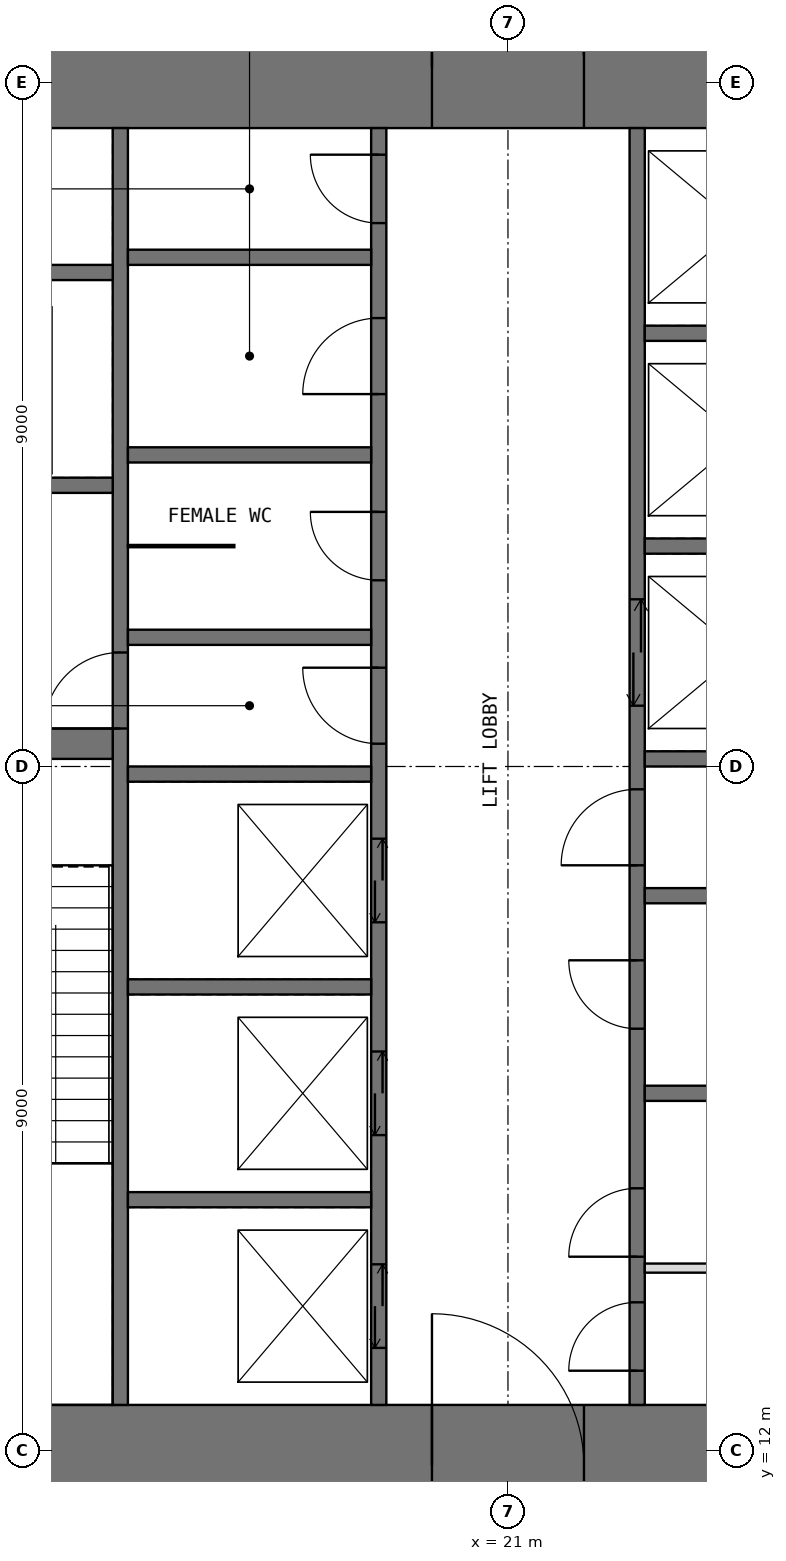
"""IFC4 building model, lengths in metres.
Left out: names, types, materials, properties, quantities, classifications, styles, units other than length and angle.
Written with IfcOpenShell. Run it as: python <this file> out.ifc"""

import sys

from ifc_helpers import new_model, si_unit, direction, frame, frame_2d, origin, place, context, subcontext, project, spatial, rectangle, extrude, element, fill, save


model = new_model("IFC4")
c1 = context("Model", 3, precision=1e-05, world=origin(), true_north=direction((0.0, 1.0)))
c2 = subcontext(c1, "Body", "Model", "MODEL_VIEW")
j1 = project(units=[si_unit("LENGTHUNIT", "METRE"), si_unit("PLANEANGLEUNIT", "RADIAN")], contexts=[c1])
p1 = place(None, origin())
s1 = spatial("IfcSite", under=j1, at=p1, CompositionType="ELEMENT")
p2 = place(p1, origin())
s2 = spatial("IfcBuilding", under=s1, at=p2, CompositionType="ELEMENT")
p3 = place(p2, frame((0.0, 0.0, 91.5)))
s3 = spatial("IfcBuildingStorey", under=s2, at=p3, CompositionType="ELEMENT", Elevation=91.5)
p4 = place(p3, frame((11.0, 11.8, -0.05), z_axis=(0.0, 0.0, 1.0), x_axis=(1.0, 0.0, 0.0)))
e1 = element("IfcWall", 1, at=p4, inside=s3, PredefinedType="SHEAR", context=c2, shape_type="SweptSolid", body=[
    extrude(rectangle(XDim=20.0, YDim=1.6, at=frame_2d((10.0, 0.0))), origin(), (0.0, 0.0, 1.0), 5.0),
])
p5 = place(p4, frame((9.0, 0.0, 0.05)))
e2 = element("IfcOpeningElement", 2, at=p5, cuts=e1, PredefinedType="OPENING", context=c2, shape_type="SweptSolid", body=[
    extrude(rectangle(XDim=2.0, YDim=2.2, at=frame_2d((1.0, 1.1))), frame((0.0, 0.81, 0.0), z_axis=(0.0, -1.0, 0.0), x_axis=(1.0, 0.0, 0.0)), (0.0, 0.0, 1.0), 1.62),
])
p6 = place(p3, frame((11.0, 30.2, -0.05), z_axis=(0.0, 0.0, 1.0), x_axis=(1.0, 0.0, 0.0)))
e3 = element("IfcWall", 3, at=p6, inside=s3, PredefinedType="SHEAR", context=c2, shape_type="SweptSolid", body=[
    extrude(rectangle(XDim=20.0, YDim=1.6, at=frame_2d((10.0, 0.0))), origin(), (0.0, 0.0, 1.0), 5.0),
])
p7 = place(p6, frame((9.0, 0.0, 0.05)))
e4 = element("IfcOpeningElement", 4, at=p7, cuts=e3, PredefinedType="OPENING", context=c2, shape_type="SweptSolid", body=[
    extrude(rectangle(XDim=2.0, YDim=2.2, at=frame_2d((1.0, 1.1))), frame((0.0, 0.81, 0.0), z_axis=(0.0, -1.0, 0.0), x_axis=(1.0, 0.0, 0.0)), (0.0, 0.0, 1.0), 1.62),
])
p8 = place(p3, frame((15.9, 12.6, -0.05), z_axis=(0.0, 0.0, 1.0), x_axis=(0.0, 1.0, 0.0)))
e5 = element("IfcWall", 5, at=p8, inside=s3, PredefinedType="SHEAR", context=c2, shape_type="SweptSolid", body=[
    extrude(rectangle(XDim=16.8, YDim=0.2, at=frame_2d((8.4, 0.0))), origin(), (0.0, 0.0, 1.0), 5.0),
])
p9 = place(p8, frame((8.9, 0.0, 0.05)))
e6 = element("IfcOpeningElement", 6, at=p9, cuts=e5, PredefinedType="OPENING", context=c2, shape_type="SweptSolid", body=[
    extrude(rectangle(XDim=1.0, YDim=2.2, at=frame_2d((0.5, 1.1))), frame((0.0, 0.11, 0.0), z_axis=(0.0, -1.0, 0.0), x_axis=(1.0, 0.0, 0.0)), (0.0, 0.0, 1.0), 0.22),
])
p10 = place(p3, frame((19.3, 12.6, -0.05), z_axis=(0.0, 0.0, 1.0), x_axis=(0.0, 1.0, 0.0)))
e7 = element("IfcWall", 7, at=p10, inside=s3, PredefinedType="SHEAR", context=c2, shape_type="SweptSolid", body=[
    extrude(rectangle(XDim=16.8, YDim=0.2, at=frame_2d((8.4, 0.0))), origin(), (0.0, 0.0, 1.0), 5.0),
])
p11 = place(p10, frame((8.7, 0.0, 0.05)))
e8 = element("IfcOpeningElement", 8, at=p11, cuts=e7, PredefinedType="OPENING", context=c2, shape_type="SweptSolid", body=[
    extrude(rectangle(XDim=1.0, YDim=2.2, at=frame_2d((0.5, 1.1))), frame((0.0, 0.11, 0.0), z_axis=(0.0, -1.0, 0.0), x_axis=(1.0, 0.0, 0.0)), (0.0, 0.0, 1.0), 0.22),
])
p12 = place(p10, frame((10.85, 0.0, 0.05)))
e9 = element("IfcOpeningElement", 9, at=p12, cuts=e7, PredefinedType="OPENING", context=c2, shape_type="SweptSolid", body=[
    extrude(rectangle(XDim=0.9, YDim=2.2, at=frame_2d((0.45, 1.1))), frame((0.0, 0.11, 0.0), z_axis=(0.0, -1.0, 0.0), x_axis=(1.0, 0.0, 0.0)), (0.0, 0.0, 1.0), 0.22),
])
p13 = place(p10, frame((13.3, 0.0, 0.05)))
e10 = element("IfcOpeningElement", 10, at=p13, cuts=e7, PredefinedType="OPENING", context=c2, shape_type="SweptSolid", body=[
    extrude(rectangle(XDim=1.0, YDim=2.2, at=frame_2d((0.5, 1.1))), frame((0.0, 0.11, 0.0), z_axis=(0.0, -1.0, 0.0), x_axis=(1.0, 0.0, 0.0)), (0.0, 0.0, 1.0), 0.22),
])
p14 = place(p10, frame((15.55, 0.0, 0.05)))
e11 = element("IfcOpeningElement", 11, at=p14, cuts=e7, PredefinedType="OPENING", context=c2, shape_type="SweptSolid", body=[
    extrude(rectangle(XDim=0.9, YDim=2.2, at=frame_2d((0.45, 1.1))), frame((0.0, 0.11, 0.0), z_axis=(0.0, -1.0, 0.0), x_axis=(1.0, 0.0, 0.0)), (0.0, 0.0, 1.0), 0.22),
])
p15 = place(p10, frame((0.75, 0.0, 0.05)))
e12 = element("IfcOpeningElement", 12, at=p15, cuts=e7, PredefinedType="OPENING", context=c2, shape_type="SweptSolid", body=[
    extrude(rectangle(XDim=1.1, YDim=2.2, at=frame_2d((0.55, 1.1))), frame((0.0, 0.11, 0.0), z_axis=(0.0, -1.0, 0.0), x_axis=(1.0, 0.0, 0.0)), (0.0, 0.0, 1.0), 0.22),
])
p16 = place(p10, frame((3.55, 0.0, 0.05)))
e13 = element("IfcOpeningElement", 13, at=p16, cuts=e7, PredefinedType="OPENING", context=c2, shape_type="SweptSolid", body=[
    extrude(rectangle(XDim=1.1, YDim=2.2, at=frame_2d((0.55, 1.1))), frame((0.0, 0.11, 0.0), z_axis=(0.0, -1.0, 0.0), x_axis=(1.0, 0.0, 0.0)), (0.0, 0.0, 1.0), 0.22),
])
p17 = place(p10, frame((6.35, 0.0, 0.05)))
e14 = element("IfcOpeningElement", 14, at=p17, cuts=e7, PredefinedType="OPENING", context=c2, shape_type="SweptSolid", body=[
    extrude(rectangle(XDim=1.1, YDim=2.2, at=frame_2d((0.55, 1.1))), frame((0.0, 0.11, 0.0), z_axis=(0.0, -1.0, 0.0), x_axis=(1.0, 0.0, 0.0)), (0.0, 0.0, 1.0), 0.22),
])
p18 = place(p3, frame((22.7, 12.6, -0.05), z_axis=(0.0, 0.0, 1.0), x_axis=(0.0, 1.0, 0.0)))
e15 = element("IfcWall", 15, at=p18, inside=s3, PredefinedType="SHEAR", context=c2, shape_type="SweptSolid", body=[
    extrude(rectangle(XDim=16.8, YDim=0.2, at=frame_2d((8.4, 0.0))), origin(), (0.0, 0.0, 1.0), 5.0),
])
p19 = place(p18, frame((0.45, 0.0, 0.05)))
e16 = element("IfcOpeningElement", 16, at=p19, cuts=e15, PredefinedType="OPENING", context=c2, shape_type="SweptSolid", body=[
    extrude(rectangle(XDim=0.9, YDim=2.2, at=frame_2d((0.45, 1.1))), frame((0.0, 0.11, 0.0), z_axis=(0.0, -1.0, 0.0), x_axis=(1.0, 0.0, 0.0)), (0.0, 0.0, 1.0), 0.22),
])
p20 = place(p18, frame((7.1, 0.0, 0.05)))
e17 = element("IfcOpeningElement", 17, at=p20, cuts=e15, PredefinedType="OPENING", context=c2, shape_type="SweptSolid", body=[
    extrude(rectangle(XDim=1.0, YDim=2.2, at=frame_2d((0.5, 1.1))), frame((0.0, 0.11, 0.0), z_axis=(0.0, -1.0, 0.0), x_axis=(1.0, 0.0, 0.0)), (0.0, 0.0, 1.0), 0.22),
])
p21 = place(p18, frame((1.95, 0.0, 0.05)))
e18 = element("IfcOpeningElement", 18, at=p21, cuts=e15, PredefinedType="OPENING", context=c2, shape_type="SweptSolid", body=[
    extrude(rectangle(XDim=0.9, YDim=2.2, at=frame_2d((0.45, 1.1))), frame((0.0, 0.11, 0.0), z_axis=(0.0, -1.0, 0.0), x_axis=(1.0, 0.0, 0.0)), (0.0, 0.0, 1.0), 0.22),
])
p22 = place(p18, frame((4.95, 0.0, 0.05)))
e19 = element("IfcOpeningElement", 19, at=p22, cuts=e15, PredefinedType="OPENING", context=c2, shape_type="SweptSolid", body=[
    extrude(rectangle(XDim=0.9, YDim=2.2, at=frame_2d((0.45, 1.1))), frame((0.0, 0.11, 0.0), z_axis=(0.0, -1.0, 0.0), x_axis=(1.0, 0.0, 0.0)), (0.0, 0.0, 1.0), 0.22),
])
p23 = place(p18, frame((9.2, 0.0, 0.05)))
e20 = element("IfcOpeningElement", 20, at=p23, cuts=e15, PredefinedType="OPENING", context=c2, shape_type="SweptSolid", body=[
    extrude(rectangle(XDim=1.4, YDim=2.4, at=frame_2d((0.7, 1.2))), frame((0.0, 0.11, 0.0), z_axis=(0.0, -1.0, 0.0), x_axis=(1.0, 0.0, 0.0)), (0.0, 0.0, 1.0), 0.22),
])
p24 = place(p3, frame((12.6, 21.3, -0.05), z_axis=(0.0, 0.0, 1.0), x_axis=(1.0, 0.0, 0.0)))
e21 = element("IfcWall", 21, at=p24, inside=s3, PredefinedType="SHEAR", context=c2, shape_type="SweptSolid", body=[
    extrude(rectangle(XDim=3.2, YDim=0.4, at=frame_2d((1.6, 0.0))), origin(), (0.0, 0.0, 1.0), 5.0),
])
p25 = place(p24, frame((1.1, 0.0, 0.05)))
e22 = element("IfcOpeningElement", 22, at=p25, cuts=e21, PredefinedType="OPENING", context=c2, shape_type="SweptSolid", body=[
    extrude(rectangle(XDim=1.0, YDim=2.2, at=frame_2d((0.5, 1.1))), frame((0.0, 0.21, 0.0), z_axis=(0.0, -1.0, 0.0), x_axis=(1.0, 0.0, 0.0)), (0.0, 0.0, 1.0), 0.42),
])
p26 = place(p3, frame((12.6, 24.7, -0.05), z_axis=(0.0, 0.0, 1.0), x_axis=(1.0, 0.0, 0.0)))
e23 = element("IfcWall", 23, at=p26, inside=s3, PredefinedType="SHEAR", context=c2, shape_type="SweptSolid", body=[
    extrude(rectangle(XDim=3.2, YDim=0.2, at=frame_2d((1.6, 0.0))), origin(), (0.0, 0.0, 1.0), 5.0),
])
p27 = place(p26, frame((1.0, 0.0, 0.05)))
e24 = element("IfcOpeningElement", 24, at=p27, cuts=e23, PredefinedType="OPENING", context=c2, shape_type="SweptSolid", body=[
    extrude(rectangle(XDim=1.2, YDim=2.2, at=frame_2d((0.6, 1.1))), frame((0.0, 0.11, 0.0), z_axis=(0.0, -1.0, 0.0), x_axis=(1.0, 0.0, 0.0)), (0.0, 0.0, 1.0), 0.22),
])
for number, where, z_axis, x_axis in (
    (25, (12.6, 27.5, -0.05), (0.0, 0.0, 1.0), (1.0, 0.0, 0.0)),
    (26, (16.0, 15.3, -0.05), (0.0, 0.0, 1.0), (1.0, 0.0, 0.0)),
    (27, (16.0, 18.1, -0.05), (0.0, 0.0, 1.0), (1.0, 0.0, 0.0)),
    (28, (16.0, 20.9, -0.05), (0.0, 0.0, 1.0), (1.0, 0.0, 0.0)),
    (29, (16.0, 22.7, -0.05), (0.0, 0.0, 1.0), (1.0, 0.0, 0.0)),
    (30, (16.0, 25.1, -0.05), (0.0, 0.0, 1.0), (1.0, 0.0, 0.0)),
    (31, (16.0, 27.7, -0.05), (0.0, 0.0, 1.0), (1.0, 0.0, 0.0)),
    (32, (22.8, 16.7, -0.05), (0.0, 0.0, 1.0), (1.0, 0.0, 0.0)),
    (33, (22.8, 19.3, -0.05), (0.0, 0.0, 1.0), (1.0, 0.0, 0.0)),
    (34, (22.8, 21.1, -0.05), (0.0, 0.0, 1.0), (1.0, 0.0, 0.0)),
    (35, (22.8, 23.9, -0.05), (0.0, 0.0, 1.0), (1.0, 0.0, 0.0)),
    (36, (22.8, 26.7, -0.05), (0.0, 0.0, 1.0), (1.0, 0.0, 0.0)),
):
    element("IfcWall", number, at=place(p3, frame(where, z_axis=z_axis, x_axis=x_axis)), inside=s3, PredefinedType="SHEAR", context=c2, shape_type="SweptSolid", body=[
        extrude(rectangle(XDim=3.2, YDim=0.2, at=frame_2d((1.6, 0.0))), origin(), (0.0, 0.0, 1.0), 5.0),
    ])
p28 = place(p3, frame((22.8, 14.4, 0.0), z_axis=(0.0, 0.0, 1.0), x_axis=(1.0, 0.0, 0.0)))
e37 = element("IfcWall", 37, at=p28, inside=s3, PredefinedType="PARTITIONING", context=c2, shape_type="SweptSolid", body=[
    extrude(rectangle(XDim=3.2, YDim=0.12, at=frame_2d((1.6, 0.0))), origin(), (0.0, 0.0, 1.0), 4.75),
])
p29 = place(p3, frame((16.0, 23.9, 0.0), z_axis=(0.0, 0.0, 1.0), x_axis=(1.0, 0.0, 0.0)))
e38 = element("IfcWall", 38, at=p29, inside=s3, PredefinedType="PARTITIONING", context=c2, shape_type="SweptSolid", body=[
    extrude(rectangle(XDim=1.4, YDim=0.03, at=frame_2d((0.7, 0.0))), origin(), (0.0, 0.0, 1.0), 4.75),
])
p30 = place(p5, origin())
e39 = element("IfcDoor", 39, at=p30, inside=s3, OperationType="DOUBLE_DOOR_SINGLE_SWING", PredefinedType="DOOR", context=c2, shape_type="SweptSolid", body=[
    extrude(rectangle(XDim=2.0, YDim=2.2, at=frame_2d((1.0, 1.1))), frame((0.0, 0.025, 0.0), z_axis=(0.0, -1.0, 0.0), x_axis=(1.0, 0.0, 0.0)), (0.0, 0.0, 1.0), 0.05),
])
fill(e2, e39)
p31 = place(p7, origin())
e40 = element("IfcDoor", 40, at=p31, inside=s3, OperationType="DOUBLE_DOOR_SINGLE_SWING", PredefinedType="DOOR", context=c2, shape_type="SweptSolid", body=[
    extrude(rectangle(XDim=2.0, YDim=2.2, at=frame_2d((1.0, 1.1))), frame((0.0, 0.025, 0.0), z_axis=(0.0, -1.0, 0.0), x_axis=(1.0, 0.0, 0.0)), (0.0, 0.0, 1.0), 0.05),
])
fill(e4, e40)
p32 = place(p19, origin())
e41 = element("IfcDoor", 41, at=p32, inside=s3, OperationType="SINGLE_SWING_LEFT", PredefinedType="DOOR", context=c2, shape_type="SweptSolid", body=[
    extrude(rectangle(XDim=0.9, YDim=2.2, at=frame_2d((0.45, 1.1))), frame((0.0, 0.025, 0.0), z_axis=(0.0, -1.0, 0.0), x_axis=(1.0, 0.0, 0.0)), (0.0, 0.0, 1.0), 0.05),
])
fill(e16, e41)
p33 = place(p9, origin())
e42 = element("IfcDoor", 42, at=p33, inside=s3, OperationType="SINGLE_SWING_LEFT", PredefinedType="DOOR", context=c2, shape_type="SweptSolid", body=[
    extrude(rectangle(XDim=1.0, YDim=2.2, at=frame_2d((0.5, 1.1))), frame((0.0, 0.025, 0.0), z_axis=(0.0, -1.0, 0.0), x_axis=(1.0, 0.0, 0.0)), (0.0, 0.0, 1.0), 0.05),
])
fill(e6, e42)
p34 = place(p11, origin())
e43 = element("IfcDoor", 43, at=p34, inside=s3, OperationType="SINGLE_SWING_RIGHT", PredefinedType="DOOR", context=c2, shape_type="SweptSolid", body=[
    extrude(rectangle(XDim=1.0, YDim=2.2, at=frame_2d((0.5, 1.1))), frame((0.0, 0.025, 0.0), z_axis=(0.0, -1.0, 0.0), x_axis=(1.0, 0.0, 0.0)), (0.0, 0.0, 1.0), 0.05),
])
fill(e8, e43)
p35 = place(p20, origin())
e44 = element("IfcDoor", 44, at=p35, inside=s3, OperationType="SINGLE_SWING_LEFT", PredefinedType="DOOR", context=c2, shape_type="SweptSolid", body=[
    extrude(rectangle(XDim=1.0, YDim=2.2, at=frame_2d((0.5, 1.1))), frame((0.0, 0.025, 0.0), z_axis=(0.0, -1.0, 0.0), x_axis=(1.0, 0.0, 0.0)), (0.0, 0.0, 1.0), 0.05),
])
fill(e17, e44)
p36 = place(p12, origin())
e45 = element("IfcDoor", 45, at=p36, inside=s3, OperationType="SINGLE_SWING_RIGHT", PredefinedType="DOOR", context=c2, shape_type="SweptSolid", body=[
    extrude(rectangle(XDim=0.9, YDim=2.2, at=frame_2d((0.45, 1.1))), frame((0.0, 0.025, 0.0), z_axis=(0.0, -1.0, 0.0), x_axis=(1.0, 0.0, 0.0)), (0.0, 0.0, 1.0), 0.05),
])
fill(e9, e45)
p37 = place(p13, origin())
e46 = element("IfcDoor", 46, at=p37, inside=s3, OperationType="SINGLE_SWING_LEFT", PredefinedType="DOOR", context=c2, shape_type="SweptSolid", body=[
    extrude(rectangle(XDim=1.0, YDim=2.2, at=frame_2d((0.5, 1.1))), frame((0.0, 0.025, 0.0), z_axis=(0.0, -1.0, 0.0), x_axis=(1.0, 0.0, 0.0)), (0.0, 0.0, 1.0), 0.05),
])
fill(e10, e46)
p38 = place(p14, origin())
e47 = element("IfcDoor", 47, at=p38, inside=s3, OperationType="SINGLE_SWING_RIGHT", PredefinedType="DOOR", context=c2, shape_type="SweptSolid", body=[
    extrude(rectangle(XDim=0.9, YDim=2.2, at=frame_2d((0.45, 1.1))), frame((0.0, 0.025, 0.0), z_axis=(0.0, -1.0, 0.0), x_axis=(1.0, 0.0, 0.0)), (0.0, 0.0, 1.0), 0.05),
])
fill(e11, e47)
p39 = place(p21, origin())
e48 = element("IfcDoor", 48, at=p39, inside=s3, OperationType="SINGLE_SWING_LEFT", PredefinedType="DOOR", context=c2, shape_type="SweptSolid", body=[
    extrude(rectangle(XDim=0.9, YDim=2.2, at=frame_2d((0.45, 1.1))), frame((0.0, 0.025, 0.0), z_axis=(0.0, -1.0, 0.0), x_axis=(1.0, 0.0, 0.0)), (0.0, 0.0, 1.0), 0.05),
])
fill(e18, e48)
p40 = place(p22, origin())
e49 = element("IfcDoor", 49, at=p40, inside=s3, OperationType="SINGLE_SWING_RIGHT", PredefinedType="DOOR", context=c2, shape_type="SweptSolid", body=[
    extrude(rectangle(XDim=0.9, YDim=2.2, at=frame_2d((0.45, 1.1))), frame((0.0, 0.025, 0.0), z_axis=(0.0, -1.0, 0.0), x_axis=(1.0, 0.0, 0.0)), (0.0, 0.0, 1.0), 0.05),
])
fill(e19, e49)
p41 = place(p15, origin())
e50 = element("IfcDoor", 50, at=p41, inside=s3, OperationType="DOUBLE_DOOR_SLIDING", PredefinedType="DOOR", context=c2, shape_type="SweptSolid", body=[
    extrude(rectangle(XDim=1.1, YDim=2.2, at=frame_2d((0.55, 1.1))), frame((0.0, 0.025, 0.0), z_axis=(0.0, -1.0, 0.0), x_axis=(1.0, 0.0, 0.0)), (0.0, 0.0, 1.0), 0.05),
])
fill(e12, e50)
p42 = place(p16, origin())
e51 = element("IfcDoor", 51, at=p42, inside=s3, OperationType="DOUBLE_DOOR_SLIDING", PredefinedType="DOOR", context=c2, shape_type="SweptSolid", body=[
    extrude(rectangle(XDim=1.1, YDim=2.2, at=frame_2d((0.55, 1.1))), frame((0.0, 0.025, 0.0), z_axis=(0.0, -1.0, 0.0), x_axis=(1.0, 0.0, 0.0)), (0.0, 0.0, 1.0), 0.05),
])
fill(e13, e51)
p43 = place(p17, origin())
e52 = element("IfcDoor", 52, at=p43, inside=s3, OperationType="DOUBLE_DOOR_SLIDING", PredefinedType="DOOR", context=c2, shape_type="SweptSolid", body=[
    extrude(rectangle(XDim=1.1, YDim=2.2, at=frame_2d((0.55, 1.1))), frame((0.0, 0.025, 0.0), z_axis=(0.0, -1.0, 0.0), x_axis=(1.0, 0.0, 0.0)), (0.0, 0.0, 1.0), 0.05),
])
fill(e14, e52)
p44 = place(p23, origin())
e53 = element("IfcDoor", 53, at=p44, inside=s3, OperationType="DOUBLE_DOOR_SLIDING", PredefinedType="DOOR", context=c2, shape_type="SweptSolid", body=[
    extrude(rectangle(XDim=1.4, YDim=2.4, at=frame_2d((0.7, 1.2))), frame((0.0, 0.025, 0.0), z_axis=(0.0, -1.0, 0.0), x_axis=(1.0, 0.0, 0.0)), (0.0, 0.0, 1.0), 0.05),
])
fill(e20, e53)
save(model, sys.argv[1])
